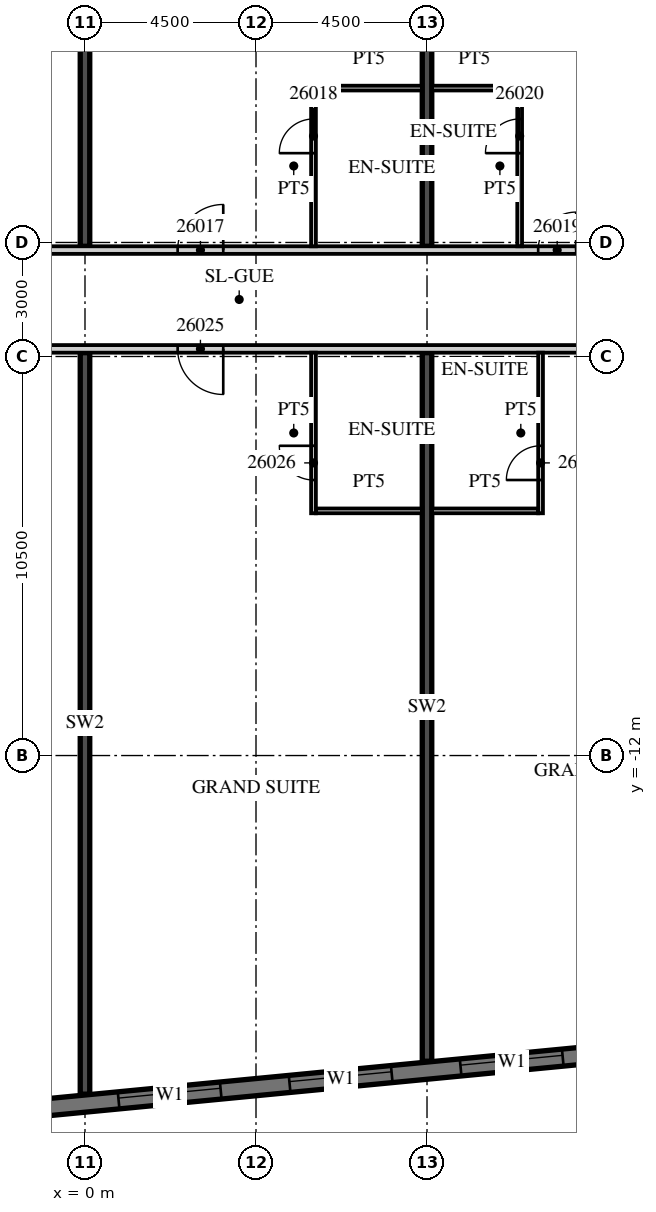
"""IFC4 building model, lengths in metres.
Left out: names, types, materials, properties, quantities, classifications, styles, units other than length and angle.
Written with IfcOpenShell. Run it as: python <this file> out.ifc"""

import sys

from ifc_helpers import new_model, si_unit, direction, frame, frame_2d, origin, place, context, subcontext, project, spatial, rectangle, extrude, element, fill, save


model = new_model("IFC4")
c1 = context("Model", 3, precision=1e-05, world=origin(), true_north=direction((0.0, 1.0)))
c2 = subcontext(c1, "Body", "Model", "MODEL_VIEW")
j1 = project(units=[si_unit("LENGTHUNIT", "METRE"), si_unit("PLANEANGLEUNIT", "RADIAN")], contexts=[c1])
p1 = place(None, origin())
s1 = spatial("IfcSite", under=j1, at=p1, CompositionType="ELEMENT")
p2 = place(p1, origin())
s2 = spatial("IfcBuilding", under=s1, at=p2, CompositionType="ELEMENT")
p3 = place(p2, frame((0.0, 0.0, 120.7)))
s3 = spatial("IfcBuildingStorey", under=s2, at=p3, CompositionType="ELEMENT", Elevation=120.7)
p4 = place(p3, frame((0.0, -20.91, 0.0), z_axis=(0.0, 0.0, 1.0), x_axis=(0.0, 1.0, 0.0)))
e1 = element("IfcWall", 1, at=p4, inside=s3, PredefinedType="SHEAR", context=c2, shape_type="SweptSolid", body=[
    extrude(rectangle(XDim=19.51, YDim=0.25, at=frame_2d((9.755, 0.0))), origin(), (0.0, 0.0, 1.0), 3.3),
])
p5 = place(p3, frame((0.0, 1.4, 0.0), z_axis=(0.0, 0.0, 1.0), x_axis=(0.0, 1.0, 0.0)))
e2 = element("IfcWall", 2, at=p5, inside=s3, PredefinedType="SHEAR", context=c2, shape_type="SweptSolid", body=[
    extrude(rectangle(XDim=19.94, YDim=0.25, at=frame_2d((9.97, 0.0))), origin(), (0.0, 0.0, 1.0), 3.3),
])
p6 = place(p3, frame((9.0, -20.044, 0.0), z_axis=(0.0, 0.0, 1.0), x_axis=(0.0, 1.0, 0.0)))
e3 = element("IfcWall", 3, at=p6, inside=s3, PredefinedType="SHEAR", context=c2, shape_type="SweptSolid", body=[
    extrude(rectangle(XDim=18.644, YDim=0.25, at=frame_2d((9.322, 0.0))), origin(), (0.0, 0.0, 1.0), 3.3),
])
p7 = place(p3, frame((9.0, 1.4, 0.0), z_axis=(0.0, 0.0, 1.0), x_axis=(0.0, 1.0, 0.0)))
e4 = element("IfcWall", 4, at=p7, inside=s3, PredefinedType="SHEAR", context=c2, shape_type="SweptSolid", body=[
    extrude(rectangle(XDim=20.807, YDim=0.25, at=frame_2d((10.403, 0.0))), origin(), (0.0, 0.0, 1.0), 3.3),
])
p8 = place(p3, frame((-13.521, -22.46, 0.0), z_axis=(0.0, 0.0, 1.0), x_axis=(0.995396096335, 0.095846812164, 0.0)))
e5 = element("IfcWall", 5, at=p8, inside=s3, PredefinedType="SOLIDWALL", context=c2, shape_type="SweptSolid", body=[
    extrude(rectangle(XDim=59.151, YDim=0.45, at=frame_2d((29.575, 0.0))), origin(), (0.0, 0.0, 1.0), 3.02),
])
p9 = place(p8, frame((0.91, 0.0, 0.45)))
e6 = element("IfcOpeningElement", 6, at=p9, cuts=e5, PredefinedType="OPENING", context=c2, shape_type="SweptSolid", body=[
    extrude(rectangle(XDim=2.7, YDim=2.25, at=frame_2d((1.35, 1.125))), frame((0.0, 0.235, 0.0), z_axis=(0.0, -1.0, 0.0), x_axis=(1.0, 0.0, 0.0)), (0.0, 0.0, 1.0), 0.47),
])
p10 = place(p8, frame((5.431, 0.0, 0.45)))
e7 = element("IfcOpeningElement", 7, at=p10, cuts=e5, PredefinedType="OPENING", context=c2, shape_type="SweptSolid", body=[
    extrude(rectangle(XDim=2.7, YDim=2.25, at=frame_2d((1.35, 1.125))), frame((0.0, 0.235, 0.0), z_axis=(0.0, -1.0, 0.0), x_axis=(1.0, 0.0, 0.0)), (0.0, 0.0, 1.0), 0.47),
])
p11 = place(p8, frame((9.952, 0.0, 0.45)))
e8 = element("IfcOpeningElement", 8, at=p11, cuts=e5, PredefinedType="OPENING", context=c2, shape_type="SweptSolid", body=[
    extrude(rectangle(XDim=2.7, YDim=2.25, at=frame_2d((1.35, 1.125))), frame((0.0, 0.235, 0.0), z_axis=(0.0, -1.0, 0.0), x_axis=(1.0, 0.0, 0.0)), (0.0, 0.0, 1.0), 0.47),
])
p12 = place(p8, frame((14.473, 0.0, 0.45)))
e9 = element("IfcOpeningElement", 9, at=p12, cuts=e5, PredefinedType="OPENING", context=c2, shape_type="SweptSolid", body=[
    extrude(rectangle(XDim=2.7, YDim=2.25, at=frame_2d((1.35, 1.125))), frame((0.0, 0.235, 0.0), z_axis=(0.0, -1.0, 0.0), x_axis=(1.0, 0.0, 0.0)), (0.0, 0.0, 1.0), 0.47),
])
p13 = place(p8, frame((18.994, 0.0, 0.45)))
e10 = element("IfcOpeningElement", 10, at=p13, cuts=e5, PredefinedType="OPENING", context=c2, shape_type="SweptSolid", body=[
    extrude(rectangle(XDim=2.7, YDim=2.25, at=frame_2d((1.35, 1.125))), frame((0.0, 0.235, 0.0), z_axis=(0.0, -1.0, 0.0), x_axis=(1.0, 0.0, 0.0)), (0.0, 0.0, 1.0), 0.47),
])
p14 = place(p8, frame((23.514, 0.0, 0.45)))
e11 = element("IfcOpeningElement", 11, at=p14, cuts=e5, PredefinedType="OPENING", context=c2, shape_type="SweptSolid", body=[
    extrude(rectangle(XDim=2.7, YDim=2.25, at=frame_2d((1.35, 1.125))), frame((0.0, 0.235, 0.0), z_axis=(0.0, -1.0, 0.0), x_axis=(1.0, 0.0, 0.0)), (0.0, 0.0, 1.0), 0.47),
])
p15 = place(p8, frame((28.035, 0.0, 0.45)))
e12 = element("IfcOpeningElement", 12, at=p15, cuts=e5, PredefinedType="OPENING", context=c2, shape_type="SweptSolid", body=[
    extrude(rectangle(XDim=2.7, YDim=2.25, at=frame_2d((1.35, 1.125))), frame((0.0, 0.235, 0.0), z_axis=(0.0, -1.0, 0.0), x_axis=(1.0, 0.0, 0.0)), (0.0, 0.0, 1.0), 0.47),
])
p16 = place(p8, frame((32.556, 0.0, 0.45)))
e13 = element("IfcOpeningElement", 13, at=p16, cuts=e5, PredefinedType="OPENING", context=c2, shape_type="SweptSolid", body=[
    extrude(rectangle(XDim=2.7, YDim=2.25, at=frame_2d((1.35, 1.125))), frame((0.0, 0.235, 0.0), z_axis=(0.0, -1.0, 0.0), x_axis=(1.0, 0.0, 0.0)), (0.0, 0.0, 1.0), 0.47),
])
p17 = place(p8, frame((37.077, 0.0, 0.45)))
e14 = element("IfcOpeningElement", 14, at=p17, cuts=e5, PredefinedType="OPENING", context=c2, shape_type="SweptSolid", body=[
    extrude(rectangle(XDim=2.7, YDim=2.25, at=frame_2d((1.35, 1.125))), frame((0.0, 0.235, 0.0), z_axis=(0.0, -1.0, 0.0), x_axis=(1.0, 0.0, 0.0)), (0.0, 0.0, 1.0), 0.47),
])
p18 = place(p8, frame((41.598, 0.0, 0.45)))
e15 = element("IfcOpeningElement", 15, at=p18, cuts=e5, PredefinedType="OPENING", context=c2, shape_type="SweptSolid", body=[
    extrude(rectangle(XDim=2.7, YDim=2.25, at=frame_2d((1.35, 1.125))), frame((0.0, 0.235, 0.0), z_axis=(0.0, -1.0, 0.0), x_axis=(1.0, 0.0, 0.0)), (0.0, 0.0, 1.0), 0.47),
])
p19 = place(p8, frame((46.118, 0.0, 0.45)))
e16 = element("IfcOpeningElement", 16, at=p19, cuts=e5, PredefinedType="OPENING", context=c2, shape_type="SweptSolid", body=[
    extrude(rectangle(XDim=2.7, YDim=2.25, at=frame_2d((1.35, 1.125))), frame((0.0, 0.235, 0.0), z_axis=(0.0, -1.0, 0.0), x_axis=(1.0, 0.0, 0.0)), (0.0, 0.0, 1.0), 0.47),
])
p20 = place(p8, frame((50.639, 0.0, 0.45)))
e17 = element("IfcOpeningElement", 17, at=p20, cuts=e5, PredefinedType="OPENING", context=c2, shape_type="SweptSolid", body=[
    extrude(rectangle(XDim=2.7, YDim=2.25, at=frame_2d((1.35, 1.125))), frame((0.0, 0.235, 0.0), z_axis=(0.0, -1.0, 0.0), x_axis=(1.0, 0.0, 0.0)), (0.0, 0.0, 1.0), 0.47),
])
p21 = place(p8, frame((55.15, 0.0, 0.45)))
e18 = element("IfcOpeningElement", 18, at=p21, cuts=e5, PredefinedType="OPENING", context=c2, shape_type="SweptSolid", body=[
    extrude(rectangle(XDim=2.7, YDim=2.25, at=frame_2d((1.35, 1.125))), frame((0.0, 0.235, 0.0), z_axis=(0.0, -1.0, 0.0), x_axis=(1.0, 0.0, 0.0)), (0.0, 0.0, 1.0), 0.47),
])
p22 = place(p3, frame((-39.316, 1.3, 0.0), z_axis=(0.0, 0.0, 1.0), x_axis=(1.0, 0.0, 0.0)))
e19 = element("IfcWall", 19, at=p22, inside=s3, PredefinedType="PARTITIONING", context=c2, shape_type="SweptSolid", body=[
    extrude(rectangle(XDim=52.816, YDim=0.2, at=frame_2d((26.408, 0.0))), origin(), (0.0, 0.0, 1.0), 3.02),
])
p23 = place(p22, frame((0.15, 0.0, 0.0)))
e20 = element("IfcOpeningElement", 20, at=p23, cuts=e19, PredefinedType="OPENING", context=c2, shape_type="SweptSolid", body=[
    extrude(rectangle(XDim=0.9, YDim=2.1, at=frame_2d((0.45, 1.05))), frame((0.0, 0.11, 0.0), z_axis=(0.0, -1.0, 0.0), x_axis=(1.0, 0.0, 0.0)), (0.0, 0.0, 1.0), 0.22),
])
p24 = place(p22, frame((3.891, 0.0, 0.0)))
e21 = element("IfcOpeningElement", 21, at=p24, cuts=e19, PredefinedType="OPENING", context=c2, shape_type="SweptSolid", body=[
    extrude(rectangle(XDim=1.0, YDim=2.1, at=frame_2d((0.5, 1.05))), frame((0.0, 0.11, 0.0), z_axis=(0.0, -1.0, 0.0), x_axis=(1.0, 0.0, 0.0)), (0.0, 0.0, 1.0), 0.22),
])
p25 = place(p22, frame((10.741, 0.0, 0.0)))
e22 = element("IfcOpeningElement", 22, at=p25, cuts=e19, PredefinedType="OPENING", context=c2, shape_type="SweptSolid", body=[
    extrude(rectangle(XDim=1.0, YDim=2.1, at=frame_2d((0.5, 1.05))), frame((0.0, 0.11, 0.0), z_axis=(0.0, -1.0, 0.0), x_axis=(1.0, 0.0, 0.0)), (0.0, 0.0, 1.0), 0.22),
])
p26 = place(p22, frame((15.266, 0.0, 0.0)))
e23 = element("IfcOpeningElement", 23, at=p26, cuts=e19, PredefinedType="OPENING", context=c2, shape_type="SweptSolid", body=[
    extrude(rectangle(XDim=1.0, YDim=2.1, at=frame_2d((0.5, 1.05))), frame((0.0, 0.11, 0.0), z_axis=(0.0, -1.0, 0.0), x_axis=(1.0, 0.0, 0.0)), (0.0, 0.0, 1.0), 0.22),
])
p27 = place(p22, frame((19.741, 0.0, 0.0)))
e24 = element("IfcOpeningElement", 24, at=p27, cuts=e19, PredefinedType="OPENING", context=c2, shape_type="SweptSolid", body=[
    extrude(rectangle(XDim=1.0, YDim=2.1, at=frame_2d((0.5, 1.05))), frame((0.0, 0.11, 0.0), z_axis=(0.0, -1.0, 0.0), x_axis=(1.0, 0.0, 0.0)), (0.0, 0.0, 1.0), 0.22),
])
p28 = place(p22, frame((26.678, 0.0, 0.0)))
e25 = element("IfcOpeningElement", 25, at=p28, cuts=e19, PredefinedType="OPENING", context=c2, shape_type="SweptSolid", body=[
    extrude(rectangle(XDim=1.2, YDim=2.1, at=frame_2d((0.6, 1.05))), frame((0.0, 0.11, 0.0), z_axis=(0.0, -1.0, 0.0), x_axis=(1.0, 0.0, 0.0)), (0.0, 0.0, 1.0), 0.22),
])
p29 = place(p22, frame((35.678, 0.0, 0.0)))
e26 = element("IfcOpeningElement", 26, at=p29, cuts=e19, PredefinedType="OPENING", context=c2, shape_type="SweptSolid", body=[
    extrude(rectangle(XDim=1.2, YDim=2.1, at=frame_2d((0.6, 1.05))), frame((0.0, 0.11, 0.0), z_axis=(0.0, -1.0, 0.0), x_axis=(1.0, 0.0, 0.0)), (0.0, 0.0, 1.0), 0.22),
])
p30 = place(p22, frame((41.754, 0.0, 0.0)))
e27 = element("IfcOpeningElement", 27, at=p30, cuts=e19, PredefinedType="OPENING", context=c2, shape_type="SweptSolid", body=[
    extrude(rectangle(XDim=1.2, YDim=2.1, at=frame_2d((0.6, 1.05))), frame((0.0, 0.11, 0.0), z_axis=(0.0, -1.0, 0.0), x_axis=(1.0, 0.0, 0.0)), (0.0, 0.0, 1.0), 0.22),
])
p31 = place(p22, frame((51.241, 0.0, 0.0)))
e28 = element("IfcOpeningElement", 28, at=p31, cuts=e19, PredefinedType="OPENING", context=c2, shape_type="SweptSolid", body=[
    extrude(rectangle(XDim=1.0, YDim=2.1, at=frame_2d((0.5, 1.05))), frame((0.0, 0.11, 0.0), z_axis=(0.0, -1.0, 0.0), x_axis=(1.0, 0.0, 0.0)), (0.0, 0.0, 1.0), 0.22),
])
p32 = place(p3, frame((6.013, 1.4, 0.0), z_axis=(0.0, 0.0, 1.0), x_axis=(0.0, 1.0, 0.0)))
e29 = element("IfcWall", 29, at=p32, inside=s3, PredefinedType="PARTITIONING", context=c2, shape_type="SweptSolid", body=[
    extrude(rectangle(XDim=4.225, YDim=0.125, at=frame_2d((2.113, 0.0))), origin(), (0.0, 0.0, 1.0), 3.02),
])
p33 = place(p32, frame((2.45, 0.0, 0.0)))
e30 = element("IfcOpeningElement", 30, at=p33, cuts=e29, PredefinedType="OPENING", context=c2, shape_type="SweptSolid", body=[
    extrude(rectangle(XDim=0.9, YDim=2.1, at=frame_2d((0.45, 1.05))), frame((0.0, 0.073, 0.0), z_axis=(0.0, -1.0, 0.0), x_axis=(1.0, 0.0, 0.0)), (0.0, 0.0, 1.0), 0.145),
])
p34 = place(p3, frame((6.075, 5.562, 0.0), z_axis=(0.0, 0.0, 1.0), x_axis=(1.0, 0.0, 0.0)))
e31 = element("IfcWall", 31, at=p34, inside=s3, PredefinedType="PARTITIONING", context=c2, shape_type="SweptSolid", body=[
    extrude(rectangle(XDim=2.8, YDim=0.125, at=frame_2d((1.4, 0.0))), origin(), (0.0, 0.0, 1.0), 3.02),
])
p35 = place(p3, frame((11.438, 1.4, 0.0), z_axis=(0.0, 0.0, 1.0), x_axis=(0.0, 1.0, 0.0)))
e32 = element("IfcWall", 32, at=p35, inside=s3, PredefinedType="PARTITIONING", context=c2, shape_type="SweptSolid", body=[
    extrude(rectangle(XDim=4.225, YDim=0.125, at=frame_2d((2.113, 0.0))), origin(), (0.0, 0.0, 1.0), 3.02),
])
p36 = place(p35, frame((2.45, 0.0, 0.0)))
e33 = element("IfcOpeningElement", 33, at=p36, cuts=e32, PredefinedType="OPENING", context=c2, shape_type="SweptSolid", body=[
    extrude(rectangle(XDim=0.9, YDim=2.1, at=frame_2d((0.45, 1.05))), frame((0.0, 0.073, 0.0), z_axis=(0.0, -1.0, 0.0), x_axis=(1.0, 0.0, 0.0)), (0.0, 0.0, 1.0), 0.145),
])
p37 = place(p3, frame((9.125, 5.562, 0.0), z_axis=(0.0, 0.0, 1.0), x_axis=(1.0, 0.0, 0.0)))
e34 = element("IfcWall", 34, at=p37, inside=s3, PredefinedType="PARTITIONING", context=c2, shape_type="SweptSolid", body=[
    extrude(rectangle(XDim=2.25, YDim=0.125, at=frame_2d((1.125, 0.0))), origin(), (0.0, 0.0, 1.0), 3.02),
])
p38 = place(p3, frame((-13.5, -1.3, 0.0), z_axis=(0.0, 0.0, 1.0), x_axis=(1.0, 0.0, 0.0)))
e35 = element("IfcWall", 35, at=p38, inside=s3, PredefinedType="PARTITIONING", context=c2, shape_type="SweptSolid", body=[
    extrude(rectangle(XDim=60.932, YDim=0.2, at=frame_2d((30.466, 0.0))), origin(), (0.0, 0.0, 1.0), 3.02),
])
p39 = place(p38, frame((2.925, 0.0, 0.0)))
e36 = element("IfcOpeningElement", 36, at=p39, cuts=e35, PredefinedType="OPENING", context=c2, shape_type="SweptSolid", body=[
    extrude(rectangle(XDim=1.0, YDim=2.1, at=frame_2d((0.5, 1.05))), frame((0.0, 0.11, 0.0), z_axis=(0.0, -1.0, 0.0), x_axis=(1.0, 0.0, 0.0)), (0.0, 0.0, 1.0), 0.22),
])
p40 = place(p38, frame((9.863, 0.0, 0.0)))
e37 = element("IfcOpeningElement", 37, at=p40, cuts=e35, PredefinedType="OPENING", context=c2, shape_type="SweptSolid", body=[
    extrude(rectangle(XDim=1.2, YDim=2.1, at=frame_2d((0.6, 1.05))), frame((0.0, 0.11, 0.0), z_axis=(0.0, -1.0, 0.0), x_axis=(1.0, 0.0, 0.0)), (0.0, 0.0, 1.0), 0.22),
])
p41 = place(p38, frame((15.938, 0.0, 0.0)))
e38 = element("IfcOpeningElement", 38, at=p41, cuts=e35, PredefinedType="OPENING", context=c2, shape_type="SweptSolid", body=[
    extrude(rectangle(XDim=1.2, YDim=2.1, at=frame_2d((0.6, 1.05))), frame((0.0, 0.11, 0.0), z_axis=(0.0, -1.0, 0.0), x_axis=(1.0, 0.0, 0.0)), (0.0, 0.0, 1.0), 0.22),
])
p42 = place(p38, frame((27.862, 0.0, 0.0)))
e39 = element("IfcOpeningElement", 39, at=p42, cuts=e35, PredefinedType="OPENING", context=c2, shape_type="SweptSolid", body=[
    extrude(rectangle(XDim=1.2, YDim=2.1, at=frame_2d((0.6, 1.05))), frame((0.0, 0.11, 0.0), z_axis=(0.0, -1.0, 0.0), x_axis=(1.0, 0.0, 0.0)), (0.0, 0.0, 1.0), 0.22),
])
p43 = place(p38, frame((34.45, 0.0, 0.0)))
e40 = element("IfcOpeningElement", 40, at=p43, cuts=e35, PredefinedType="OPENING", context=c2, shape_type="SweptSolid", body=[
    extrude(rectangle(XDim=1.0, YDim=2.1, at=frame_2d((0.5, 1.05))), frame((0.0, 0.11, 0.0), z_axis=(0.0, -1.0, 0.0), x_axis=(1.0, 0.0, 0.0)), (0.0, 0.0, 1.0), 0.22),
])
p44 = place(p38, frame((36.55, 0.0, 0.0)))
e41 = element("IfcOpeningElement", 41, at=p44, cuts=e35, PredefinedType="OPENING", context=c2, shape_type="SweptSolid", body=[
    extrude(rectangle(XDim=1.0, YDim=2.1, at=frame_2d((0.5, 1.05))), frame((0.0, 0.11, 0.0), z_axis=(0.0, -1.0, 0.0), x_axis=(1.0, 0.0, 0.0)), (0.0, 0.0, 1.0), 0.22),
])
p45 = place(p38, frame((41.075, 0.0, 0.0)))
e42 = element("IfcOpeningElement", 42, at=p45, cuts=e35, PredefinedType="OPENING", context=c2, shape_type="SweptSolid", body=[
    extrude(rectangle(XDim=1.0, YDim=2.1, at=frame_2d((0.5, 1.05))), frame((0.0, 0.11, 0.0), z_axis=(0.0, -1.0, 0.0), x_axis=(1.0, 0.0, 0.0)), (0.0, 0.0, 1.0), 0.22),
])
p46 = place(p38, frame((45.55, 0.0, 0.0)))
e43 = element("IfcOpeningElement", 43, at=p46, cuts=e35, PredefinedType="OPENING", context=c2, shape_type="SweptSolid", body=[
    extrude(rectangle(XDim=1.0, YDim=2.1, at=frame_2d((0.5, 1.05))), frame((0.0, 0.11, 0.0), z_axis=(0.0, -1.0, 0.0), x_axis=(1.0, 0.0, 0.0)), (0.0, 0.0, 1.0), 0.22),
])
p47 = place(p38, frame((50.075, 0.0, 0.0)))
e44 = element("IfcOpeningElement", 44, at=p47, cuts=e35, PredefinedType="OPENING", context=c2, shape_type="SweptSolid", body=[
    extrude(rectangle(XDim=1.0, YDim=2.1, at=frame_2d((0.5, 1.05))), frame((0.0, 0.11, 0.0), z_axis=(0.0, -1.0, 0.0), x_axis=(1.0, 0.0, 0.0)), (0.0, 0.0, 1.0), 0.22),
])
p48 = place(p38, frame((54.575, 0.0, 0.0)))
e45 = element("IfcOpeningElement", 45, at=p48, cuts=e35, PredefinedType="OPENING", context=c2, shape_type="SweptSolid", body=[
    extrude(rectangle(XDim=1.0, YDim=2.1, at=frame_2d((0.5, 1.05))), frame((0.0, 0.11, 0.0), z_axis=(0.0, -1.0, 0.0), x_axis=(1.0, 0.0, 0.0)), (0.0, 0.0, 1.0), 0.22),
])
p49 = place(p38, frame((59.882, 0.0, 0.0)))
e46 = element("IfcOpeningElement", 46, at=p49, cuts=e35, PredefinedType="OPENING", context=c2, shape_type="SweptSolid", body=[
    extrude(rectangle(XDim=0.9, YDim=2.1, at=frame_2d((0.45, 1.05))), frame((0.0, 0.11, 0.0), z_axis=(0.0, -1.0, 0.0), x_axis=(1.0, 0.0, 0.0)), (0.0, 0.0, 1.0), 0.22),
])
p50 = place(p3, frame((6.013, -5.625, 0.0), z_axis=(0.0, 0.0, 1.0), x_axis=(0.0, 1.0, 0.0)))
e47 = element("IfcWall", 47, at=p50, inside=s3, PredefinedType="PARTITIONING", context=c2, shape_type="SweptSolid", body=[
    extrude(rectangle(XDim=4.225, YDim=0.125, at=frame_2d((2.113, 0.0))), origin(), (0.0, 0.0, 1.0), 3.02),
])
p51 = place(p50, frame((0.875, 0.0, 0.0)))
e48 = element("IfcOpeningElement", 48, at=p51, cuts=e47, PredefinedType="OPENING", context=c2, shape_type="SweptSolid", body=[
    extrude(rectangle(XDim=0.9, YDim=2.1, at=frame_2d((0.45, 1.05))), frame((0.0, 0.073, 0.0), z_axis=(0.0, -1.0, 0.0), x_axis=(1.0, 0.0, 0.0)), (0.0, 0.0, 1.0), 0.145),
])
p52 = place(p3, frame((6.075, -5.562, 0.0), z_axis=(0.0, 0.0, 1.0), x_axis=(1.0, 0.0, 0.0)))
e49 = element("IfcWall", 49, at=p52, inside=s3, PredefinedType="PARTITIONING", context=c2, shape_type="SweptSolid", body=[
    extrude(rectangle(XDim=2.8, YDim=0.125, at=frame_2d((1.4, 0.0))), origin(), (0.0, 0.0, 1.0), 3.02),
])
p53 = place(p3, frame((11.988, -5.625, 0.0), z_axis=(0.0, 0.0, 1.0), x_axis=(0.0, 1.0, 0.0)))
e50 = element("IfcWall", 50, at=p53, inside=s3, PredefinedType="PARTITIONING", context=c2, shape_type="SweptSolid", body=[
    extrude(rectangle(XDim=4.225, YDim=0.125, at=frame_2d((2.113, 0.0))), origin(), (0.0, 0.0, 1.0), 3.02),
])
p54 = place(p53, frame((0.875, 0.0, 0.0)))
e51 = element("IfcOpeningElement", 51, at=p54, cuts=e50, PredefinedType="OPENING", context=c2, shape_type="SweptSolid", body=[
    extrude(rectangle(XDim=0.9, YDim=2.1, at=frame_2d((0.45, 1.05))), frame((0.0, 0.073, 0.0), z_axis=(0.0, -1.0, 0.0), x_axis=(1.0, 0.0, 0.0)), (0.0, 0.0, 1.0), 0.145),
])
p55 = place(p3, frame((9.125, -5.562, 0.0), z_axis=(0.0, 0.0, 1.0), x_axis=(1.0, 0.0, 0.0)))
e52 = element("IfcWall", 52, at=p55, inside=s3, PredefinedType="PARTITIONING", context=c2, shape_type="SweptSolid", body=[
    extrude(rectangle(XDim=2.8, YDim=0.125, at=frame_2d((1.4, 0.0))), origin(), (0.0, 0.0, 1.0), 3.02),
])
p56 = place(p12, origin())
e53 = element("IfcWindow", 53, at=p56, inside=s3, PartitioningType="SINGLE_PANEL", PredefinedType="WINDOW", context=c2, shape_type="SweptSolid", body=[
    extrude(rectangle(XDim=2.7, YDim=2.25, at=frame_2d((1.35, 1.125))), frame((0.0, 0.09, 0.0), z_axis=(0.0, -1.0, 0.0), x_axis=(1.0, 0.0, 0.0)), (0.0, 0.0, 1.0), 0.06),
])
fill(e9, e53)
p57 = place(p13, origin())
e54 = element("IfcWindow", 54, at=p57, inside=s3, PartitioningType="SINGLE_PANEL", PredefinedType="WINDOW", context=c2, shape_type="SweptSolid", body=[
    extrude(rectangle(XDim=2.7, YDim=2.25, at=frame_2d((1.35, 1.125))), frame((0.0, 0.09, 0.0), z_axis=(0.0, -1.0, 0.0), x_axis=(1.0, 0.0, 0.0)), (0.0, 0.0, 1.0), 0.06),
])
fill(e10, e54)
p58 = place(p14, origin())
e55 = element("IfcWindow", 55, at=p58, inside=s3, PartitioningType="SINGLE_PANEL", PredefinedType="WINDOW", context=c2, shape_type="SweptSolid", body=[
    extrude(rectangle(XDim=2.7, YDim=2.25, at=frame_2d((1.35, 1.125))), frame((0.0, 0.09, 0.0), z_axis=(0.0, -1.0, 0.0), x_axis=(1.0, 0.0, 0.0)), (0.0, 0.0, 1.0), 0.06),
])
fill(e11, e55)
p59 = place(p30, origin())
e56 = element("IfcDoor", 56, at=p59, inside=s3, OperationType="SINGLE_SWING_RIGHT", PredefinedType="DOOR", context=c2, shape_type="SweptSolid", body=[
    extrude(rectangle(XDim=1.2, YDim=2.1, at=frame_2d((0.6, 1.05))), frame((0.0, 0.025, 0.0), z_axis=(0.0, -1.0, 0.0), x_axis=(1.0, 0.0, 0.0)), (0.0, 0.0, 1.0), 0.05),
])
fill(e27, e56)
p60 = place(p33, origin())
e57 = element("IfcDoor", 57, at=p60, inside=s3, OperationType="SINGLE_SWING_LEFT", PredefinedType="DOOR", context=c2, shape_type="SweptSolid", body=[
    extrude(rectangle(XDim=0.9, YDim=2.1, at=frame_2d((0.45, 1.05))), frame((0.0, 0.025, 0.0), z_axis=(0.0, -1.0, 0.0), x_axis=(1.0, 0.0, 0.0)), (0.0, 0.0, 1.0), 0.05),
])
fill(e30, e57)
p61 = place(p31, origin())
e58 = element("IfcDoor", 58, at=p61, inside=s3, OperationType="SINGLE_SWING_RIGHT", PredefinedType="DOOR", context=c2, shape_type="SweptSolid", body=[
    extrude(rectangle(XDim=1.0, YDim=2.1, at=frame_2d((0.5, 1.05))), frame((0.0, 0.025, 0.0), z_axis=(0.0, -1.0, 0.0), x_axis=(1.0, 0.0, 0.0)), (0.0, 0.0, 1.0), 0.05),
])
fill(e28, e58)
p62 = place(p36, origin())
e59 = element("IfcDoor", 59, at=p62, inside=s3, OperationType="SINGLE_SWING_LEFT", PredefinedType="DOOR", context=c2, shape_type="SweptSolid", body=[
    extrude(rectangle(XDim=0.9, YDim=2.1, at=frame_2d((0.45, 1.05))), frame((0.0, 0.025, 0.0), z_axis=(0.0, -1.0, 0.0), x_axis=(1.0, 0.0, 0.0)), (0.0, 0.0, 1.0), 0.05),
])
fill(e33, e59)
p63 = place(p41, origin())
e60 = element("IfcDoor", 60, at=p63, inside=s3, OperationType="SINGLE_SWING_RIGHT", PredefinedType="DOOR", context=c2, shape_type="SweptSolid", body=[
    extrude(rectangle(XDim=1.2, YDim=2.1, at=frame_2d((0.6, 1.05))), frame((0.0, 0.025, 0.0), z_axis=(0.0, -1.0, 0.0), x_axis=(1.0, 0.0, 0.0)), (0.0, 0.0, 1.0), 0.05),
])
fill(e38, e60)
p64 = place(p51, origin())
e61 = element("IfcDoor", 61, at=p64, inside=s3, OperationType="SINGLE_SWING_RIGHT", PredefinedType="DOOR", context=c2, shape_type="SweptSolid", body=[
    extrude(rectangle(XDim=0.9, YDim=2.1, at=frame_2d((0.45, 1.05))), frame((0.0, 0.025, 0.0), z_axis=(0.0, -1.0, 0.0), x_axis=(1.0, 0.0, 0.0)), (0.0, 0.0, 1.0), 0.05),
])
fill(e48, e61)
p65 = place(p54, origin())
e62 = element("IfcDoor", 62, at=p65, inside=s3, OperationType="SINGLE_SWING_LEFT", PredefinedType="DOOR", context=c2, shape_type="SweptSolid", body=[
    extrude(rectangle(XDim=0.9, YDim=2.1, at=frame_2d((0.45, 1.05))), frame((0.0, 0.025, 0.0), z_axis=(0.0, -1.0, 0.0), x_axis=(1.0, 0.0, 0.0)), (0.0, 0.0, 1.0), 0.05),
])
fill(e51, e62)
save(model, sys.argv[1])
